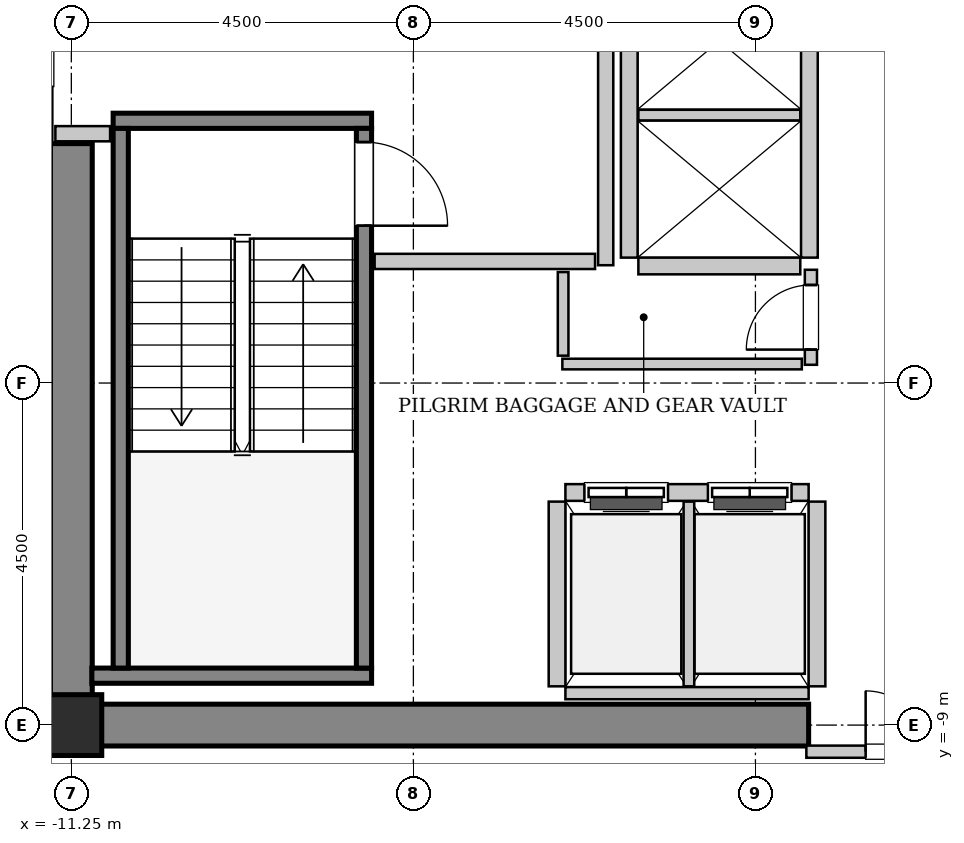
"""IFC4 building model, lengths in metres.
Left out: names, types, materials, properties, quantities, classifications, styles, units other than length and angle.
Written with IfcOpenShell. Run it as: python <this file> out.ifc"""

import sys

from ifc_helpers import new_model, si_unit, direction, frame, frame_2d, origin, origin_2d, place, context, subcontext, project, spatial, rectangle, hollow_rectangle, extrude, source, transform, mapped, element, fill, save


model = new_model("IFC4")
c1 = context("Model", 3, precision=1e-05, world=origin(), true_north=direction((0.0, 1.0)))
c2 = subcontext(c1, "Body", "Model", "MODEL_VIEW")
j1 = project(units=[si_unit("LENGTHUNIT", "METRE"), si_unit("PLANEANGLEUNIT", "RADIAN")], contexts=[c1])
p1 = place(None, origin())
s1 = spatial("IfcSite", under=j1, at=p1, CompositionType="ELEMENT")
p2 = place(p1, origin())
s2 = spatial("IfcBuilding", under=s1, at=p2, CompositionType="ELEMENT")
p3 = place(p2, frame((0.0, 0.0, 194.4)))
s3 = spatial("IfcBuildingStorey", under=s2, at=p3, CompositionType="ELEMENT", Elevation=194.4)
m1 = source(origin(), c2, "Body", "SweptSolid", [
    extrude(rectangle(XDim=9.975, YDim=0.55, at=frame_2d((4.987, 0.0))), origin(), (0.0, 0.0, 1.0), 3.8),
])
p4 = place(p3, frame((-11.525, -9.0, 0.0), z_axis=(0.0, 0.0, 1.0), x_axis=(1.0, 0.0, 0.0)))
e1 = element("IfcWall", 1, at=p4, inside=s3, PredefinedType="SHEAR", context=c2, shape_type="MappedRepresentation", body=[
    mapped(m1, transform((0.0, 0.0, 0.0), x_axis=(1.0, 0.0, 0.0), y_axis=(0.0, 1.0, 0.0), z_axis=(0.0, 0.0, 1.0), scale=1.0)),
])
m2 = source(origin(), c2, "Body", "SweptSolid", [
    extrude(rectangle(XDim=7.375, YDim=0.55, at=frame_2d((3.688, 0.0))), origin(), (0.0, 0.0, 1.0), 3.8),
])
p5 = place(p3, frame((-11.25, -8.725, 0.0), z_axis=(0.0, 0.0, 1.0), x_axis=(0.0, 1.0, 0.0)))
e2 = element("IfcWall", 2, at=p5, inside=s3, PredefinedType="SHEAR", context=c2, shape_type="MappedRepresentation", body=[
    mapped(m2, transform((0.0, 0.0, 0.0), x_axis=(1.0, 0.0, 0.0), y_axis=(0.0, 1.0, 0.0), z_axis=(0.0, 0.0, 1.0), scale=1.0)),
])
m3 = source(origin(), c2, "Body", "SweptSolid", [
    extrude(hollow_rectangle(XDim=0.8, YDim=0.8, WallThickness=0.04, InnerFilletRadius=0.04, OuterFilletRadius=0.08, at=origin_2d()), origin(), (0.0, 0.0, 1.0), 3.8),
])
p6 = place(p3, frame((-11.25, -9.0, 0.0), z_axis=(0.0, 0.0, 1.0), x_axis=(1.0, 0.0, 0.0)))
e3 = element("IfcColumn", 3, at=p6, inside=s3, PredefinedType="COLUMN", context=c2, shape_type="MappedRepresentation", body=[
    mapped(m3, transform((0.0, 0.0, 0.0), x_axis=(1.0, 0.0, 0.0), y_axis=(0.0, 1.0, 0.0), z_axis=(0.0, 0.0, 1.0), scale=1.0)),
])
m4 = source(origin(), c2, "Body", "SweptSolid", [
    extrude(rectangle(XDim=3.4, YDim=0.2, at=frame_2d((1.7, 0.0))), origin(), (0.0, 0.0, 1.0), 3.8),
])
p7 = place(p3, frame((-10.7, -1.05, 0.0), z_axis=(0.0, 0.0, 1.0), x_axis=(1.0, 0.0, 0.0)))
e4 = element("IfcWall", 4, at=p7, inside=s3, PredefinedType="SOLIDWALL", context=c2, shape_type="MappedRepresentation", body=[
    mapped(m4, transform((0.0, 0.0, 0.0), x_axis=(1.0, 0.0, 0.0), y_axis=(0.0, 1.0, 0.0), z_axis=(0.0, 0.0, 1.0), scale=1.0)),
])
m5 = source(origin(), c2, "Body", "SweptSolid", [
    extrude(rectangle(XDim=3.68, YDim=0.2, at=frame_2d((1.84, 0.0))), origin(), (0.0, 0.0, 1.0), 3.8),
])
p8 = place(p3, frame((-10.98, -8.35, 0.0), z_axis=(0.0, 0.0, 1.0), x_axis=(1.0, 0.0, 0.0)))
e5 = element("IfcWall", 5, at=p8, inside=s3, PredefinedType="SOLIDWALL", context=c2, shape_type="MappedRepresentation", body=[
    mapped(m5, transform((0.0, 0.0, 0.0), x_axis=(1.0, 0.0, 0.0), y_axis=(0.0, 1.0, 0.0), z_axis=(0.0, 0.0, 1.0), scale=1.0)),
])
m6 = source(origin(), c2, "Body", "SweptSolid", [
    extrude(rectangle(XDim=7.1, YDim=0.2, at=frame_2d((3.55, 0.0))), origin(), (0.0, 0.0, 1.0), 3.8),
])
p9 = place(p3, frame((-10.6, -1.15, 0.0), z_axis=(0.0, 0.0, 1.0), x_axis=(0.0, -1.0, 0.0)))
e6 = element("IfcWall", 6, at=p9, inside=s3, PredefinedType="SOLIDWALL", context=c2, shape_type="MappedRepresentation", body=[
    mapped(m6, transform((0.0, 0.0, 0.0), x_axis=(1.0, 0.0, 0.0), y_axis=(0.0, 1.0, 0.0), z_axis=(0.0, 0.0, 1.0), scale=1.0)),
])
p10 = place(p3, frame((-7.4, -1.15, 0.0), z_axis=(0.0, 0.0, 1.0), x_axis=(0.0, -1.0, 0.0)))
e7 = element("IfcWall", 7, at=p10, inside=s3, PredefinedType="SOLIDWALL", context=c2, shape_type="MappedRepresentation", body=[
    mapped(m6, transform((0.0, 0.0, 0.0), x_axis=(1.0, 0.0, 0.0), y_axis=(0.0, 1.0, 0.0), z_axis=(0.0, 0.0, 1.0), scale=1.0)),
])
p11 = place(p10, frame((0.18, 0.0, 0.0)))
e8 = element("IfcOpeningElement", 8, at=p11, cuts=e7, PredefinedType="OPENING", context=c2, shape_type="SweptSolid", body=[
    extrude(rectangle(XDim=1.1, YDim=2.15, at=frame_2d((0.55, 1.075))), frame((0.0, 0.11, 0.0), z_axis=(0.0, -1.0, 0.0), x_axis=(1.0, 0.0, 0.0)), (0.0, 0.0, 1.0), 0.22),
])
m7 = source(origin(), c2, "Body", "SweptSolid", [
    extrude(rectangle(XDim=3.2, YDim=0.22, at=frame_2d((1.6, 0.0))), origin(), (0.0, 0.0, 1.0), 3.535),
])
p12 = place(p3, frame((-1.55, -5.94, 0.0), z_axis=(0.0, 0.0, 1.0), x_axis=(-1.0, 0.0, 0.0)))
e9 = element("IfcWall", 9, at=p12, inside=s3, PredefinedType="SOLIDWALL", context=c2, shape_type="MappedRepresentation", body=[
    mapped(m7, transform((0.0, 0.0, 0.0), x_axis=(1.0, 0.0, 0.0), y_axis=(0.0, 1.0, 0.0), z_axis=(0.0, 0.0, 1.0), scale=1.0)),
])
p13 = place(p12, frame((1.85, 0.0, 0.0)))
e10 = element("IfcOpeningElement", 10, at=p13, cuts=e9, PredefinedType="OPENING", context=c2, shape_type="SweptSolid", body=[
    extrude(rectangle(XDim=1.1, YDim=2.2, at=frame_2d((0.55, 1.1))), frame((0.0, 0.12, 0.0), z_axis=(0.0, -1.0, 0.0), x_axis=(1.0, 0.0, 0.0)), (0.0, 0.0, 1.0), 0.24),
])
p14 = place(p12, frame((0.225, 0.0, 0.0)))
e11 = element("IfcOpeningElement", 11, at=p14, cuts=e9, PredefinedType="OPENING", context=c2, shape_type="SweptSolid", body=[
    extrude(rectangle(XDim=1.1, YDim=2.2, at=frame_2d((0.55, 1.1))), frame((0.0, 0.12, 0.0), z_axis=(0.0, -1.0, 0.0), x_axis=(1.0, 0.0, 0.0)), (0.0, 0.0, 1.0), 0.24),
])
m8 = source(origin(), c2, "Body", "SweptSolid", [
    extrude(rectangle(XDim=3.2, YDim=0.16, at=frame_2d((1.6, 0.0))), origin(), (0.0, 0.0, 1.0), 2.425),
])
p15 = place(p3, frame((-4.75, -8.58, 0.0), z_axis=(0.0, 0.0, 1.0), x_axis=(1.0, 0.0, 0.0)))
e12 = element("IfcWall", 12, at=p15, inside=s3, PredefinedType="PARTITIONING", context=c2, shape_type="MappedRepresentation", body=[
    mapped(m8, transform((0.0, 0.0, 0.0), x_axis=(1.0, 0.0, 0.0), y_axis=(0.0, 1.0, 0.0), z_axis=(0.0, 0.0, 1.0), scale=1.0)),
])
m9 = source(origin(), c2, "Body", "SweptSolid", [
    extrude(rectangle(XDim=2.43, YDim=0.22, at=frame_2d((1.215, 0.0))), origin(), (0.0, 0.0, 1.0), 3.535),
])
p16 = place(p3, frame((-4.86, -6.06, 0.0), z_axis=(0.0, 0.0, 1.0), x_axis=(0.0, -1.0, 0.0)))
e13 = element("IfcWall", 13, at=p16, inside=s3, PredefinedType="SOLIDWALL", context=c2, shape_type="MappedRepresentation", body=[
    mapped(m9, transform((0.0, 0.0, 0.0), x_axis=(1.0, 0.0, 0.0), y_axis=(0.0, 1.0, 0.0), z_axis=(0.0, 0.0, 1.0), scale=1.0)),
])
m10 = source(origin(), c2, "Body", "SweptSolid", [
    extrude(rectangle(XDim=2.43, YDim=0.14, at=frame_2d((1.215, 0.0))), origin(), (0.0, 0.0, 1.0), 3.535),
])
p17 = place(p3, frame((-3.125, -8.49, 0.0), z_axis=(0.0, 0.0, 1.0), x_axis=(0.0, 1.0, 0.0)))
e14 = element("IfcWall", 14, at=p17, inside=s3, PredefinedType="PARTITIONING", context=c2, shape_type="MappedRepresentation", body=[
    mapped(m10, transform((0.0, 0.0, 0.0), x_axis=(1.0, 0.0, 0.0), y_axis=(0.0, 1.0, 0.0), z_axis=(0.0, 0.0, 1.0), scale=1.0)),
])
p18 = place(p3, frame((-1.44, -8.49, 0.0), z_axis=(0.0, 0.0, 1.0), x_axis=(0.0, 1.0, 0.0)))
e15 = element("IfcWall", 15, at=p18, inside=s3, PredefinedType="SOLIDWALL", context=c2, shape_type="MappedRepresentation", body=[
    mapped(m9, transform((0.0, 0.0, 0.0), x_axis=(1.0, 0.0, 0.0), y_axis=(0.0, 1.0, 0.0), z_axis=(0.0, 0.0, 1.0), scale=1.0)),
])
m11 = source(origin(), c2, "Body", "SweptSolid", [
    extrude(rectangle(XDim=5.7, YDim=0.22, at=frame_2d((2.85, 0.0))), origin(), (0.0, 0.0, 1.0), 3.535),
])
for number, where, z_axis, x_axis in (
    (16, (-1.54, -2.85, 0.0), (0.0, 0.0, 1.0), (0.0, 1.0, 0.0)),
    (17, (-3.91, 2.85, 0.0), (0.0, 0.0, 1.0), (0.0, -1.0, 0.0)),
):
    element("IfcWall", number, at=place(p3, frame(where, z_axis=z_axis, x_axis=x_axis)), inside=s3, PredefinedType="SOLIDWALL", context=c2, shape_type="MappedRepresentation", body=[
        mapped(m11, transform((0.0, 0.0, 0.0), x_axis=(1.0, 0.0, 0.0), y_axis=(0.0, 1.0, 0.0), z_axis=(0.0, 0.0, 1.0), scale=1.0)),
    ])
m12 = source(origin(), c2, "Body", "SweptSolid", [
    extrude(rectangle(XDim=2.13, YDim=0.22, at=frame_2d((1.065, 0.0))), origin(), (0.0, 0.0, 1.0), 3.535),
])
p19 = place(p3, frame((-3.79, -2.96, 0.0), z_axis=(0.0, 0.0, 1.0), x_axis=(1.0, 0.0, 0.0)))
e18 = element("IfcWall", 18, at=p19, inside=s3, PredefinedType="SOLIDWALL", context=c2, shape_type="MappedRepresentation", body=[
    mapped(m12, transform((0.0, 0.0, 0.0), x_axis=(1.0, 0.0, 0.0), y_axis=(0.0, 1.0, 0.0), z_axis=(0.0, 0.0, 1.0), scale=1.0)),
])
m13 = source(origin(), c2, "Body", "SweptSolid", [
    extrude(rectangle(XDim=2.13, YDim=0.14, at=frame_2d((1.065, 0.0))), origin(), (0.0, 0.0, 1.0), 3.535),
])
p20 = place(p3, frame((-3.79, -0.975, 0.0), z_axis=(0.0, 0.0, 1.0), x_axis=(1.0, 0.0, 0.0)))
e19 = element("IfcWall", 19, at=p20, inside=s3, PredefinedType="PARTITIONING", context=c2, shape_type="MappedRepresentation", body=[
    mapped(m13, transform((0.0, 0.0, 0.0), x_axis=(1.0, 0.0, 0.0), y_axis=(0.0, 1.0, 0.0), z_axis=(0.0, 0.0, 1.0), scale=1.0)),
])
m14 = source(origin(), c2, "Body", "SweptSolid", [
    extrude(rectangle(XDim=5.9, YDim=0.2, at=frame_2d((2.95, 0.0))), origin(), (0.0, 0.0, 1.0), 3.535),
])
p21 = place(p3, frame((-4.22, -2.95, 0.0), z_axis=(0.0, 0.0, 1.0), x_axis=(0.0, 1.0, 0.0)))
e20 = element("IfcWall", 20, at=p21, inside=s3, PredefinedType="PARTITIONING", context=c2, shape_type="MappedRepresentation", body=[
    mapped(m14, transform((0.0, 0.0, 0.0), x_axis=(1.0, 0.0, 0.0), y_axis=(0.0, 1.0, 0.0), z_axis=(0.0, 0.0, 1.0), scale=1.0)),
])
m15 = source(origin(), c2, "Body", "SweptSolid", [
    extrude(rectangle(XDim=2.9, YDim=0.2, at=frame_2d((1.45, 0.0))), origin(), (0.0, 0.0, 1.0), 3.535),
])
p22 = place(p3, frame((-7.26, -2.9, 0.0), z_axis=(0.0, 0.0, 1.0), x_axis=(1.0, 0.0, 0.0)))
e21 = element("IfcWall", 21, at=p22, inside=s3, PredefinedType="PARTITIONING", context=c2, shape_type="MappedRepresentation", body=[
    mapped(m15, transform((0.0, 0.0, 0.0), x_axis=(1.0, 0.0, 0.0), y_axis=(0.0, 1.0, 0.0), z_axis=(0.0, 0.0, 1.0), scale=1.0)),
])
m16 = source(origin(), c2, "Body", "SweptSolid", [
    extrude(rectangle(XDim=0.72, YDim=0.2, at=frame_2d((0.36, 0.0))), origin(), (0.0, 0.0, 1.0), 3.535),
])
p23 = place(p3, frame((-11.46, -1.22, 0.0), z_axis=(0.0, 0.0, 1.0), x_axis=(1.0, 0.0, 0.0)))
e22 = element("IfcWall", 22, at=p23, inside=s3, PredefinedType="PARTITIONING", context=c2, shape_type="MappedRepresentation", body=[
    mapped(m16, transform((0.0, 0.0, 0.0), x_axis=(1.0, 0.0, 0.0), y_axis=(0.0, 1.0, 0.0), z_axis=(0.0, 0.0, 1.0), scale=1.0)),
])
m17 = source(origin(), c2, "Body", "SweptSolid", [
    extrude(rectangle(XDim=3.16, YDim=0.16, at=frame_2d((1.58, 0.0))), origin(), (0.0, 0.0, 1.0), 2.425),
])
p24 = place(p3, frame((-1.58, -9.35, 0.0), z_axis=(0.0, 0.0, 1.0), x_axis=(1.0, 0.0, 0.0)))
e23 = element("IfcWall", 23, at=p24, inside=s3, PredefinedType="PARTITIONING", context=c2, shape_type="MappedRepresentation", body=[
    mapped(m17, transform((0.0, 0.0, 0.0), x_axis=(1.0, 0.0, 0.0), y_axis=(0.0, 1.0, 0.0), z_axis=(0.0, 0.0, 1.0), scale=1.0)),
])
p25 = place(p24, frame((0.78, 0.0, 0.0)))
e24 = element("IfcOpeningElement", 24, at=p25, cuts=e23, PredefinedType="OPENING", context=c2, shape_type="SweptSolid", body=[
    extrude(rectangle(XDim=1.6, YDim=2.3, at=frame_2d((0.8, 1.15))), frame((0.0, 0.09, 0.0), z_axis=(0.0, -1.0, 0.0), x_axis=(1.0, 0.0, 0.0)), (0.0, 0.0, 1.0), 0.18),
])
m18 = source(origin(), c2, "Body", "SweptSolid", [
    extrude(rectangle(XDim=1.25, YDim=0.16, at=frame_2d((0.625, 0.0))), origin(), (0.0, 0.0, 1.0), 3.535),
])
p26 = place(p3, frame((-1.52, -4.26, 0.0), z_axis=(0.0, 0.0, 1.0), x_axis=(0.0, 1.0, 0.0)))
e25 = element("IfcWall", 25, at=p26, inside=s3, PredefinedType="PARTITIONING", context=c2, shape_type="MappedRepresentation", body=[
    mapped(m18, transform((0.0, 0.0, 0.0), x_axis=(1.0, 0.0, 0.0), y_axis=(0.0, 1.0, 0.0), z_axis=(0.0, 0.0, 1.0), scale=1.0)),
])
p27 = place(p26, frame((0.2, 0.0, 0.0)))
e26 = element("IfcOpeningElement", 26, at=p27, cuts=e25, PredefinedType="OPENING", context=c2, shape_type="SweptSolid", body=[
    extrude(rectangle(XDim=0.85, YDim=2.1, at=frame_2d((0.425, 1.05))), frame((0.0, 0.09, 0.0), z_axis=(0.0, -1.0, 0.0), x_axis=(1.0, 0.0, 0.0)), (0.0, 0.0, 1.0), 0.18),
])
m19 = source(origin(), c2, "Body", "SweptSolid", [
    extrude(rectangle(XDim=3.15, YDim=0.14, at=frame_2d((1.575, 0.0))), origin(), (0.0, 0.0, 1.0), 3.535),
])
p28 = place(p3, frame((-4.79, -4.25, 0.0), z_axis=(0.0, 0.0, 1.0), x_axis=(1.0, 0.0, 0.0)))
e27 = element("IfcWall", 27, at=p28, inside=s3, PredefinedType="PARTITIONING", context=c2, shape_type="MappedRepresentation", body=[
    mapped(m19, transform((0.0, 0.0, 0.0), x_axis=(1.0, 0.0, 0.0), y_axis=(0.0, 1.0, 0.0), z_axis=(0.0, 0.0, 1.0), scale=1.0)),
])
m20 = source(origin(), c2, "Body", "SweptSolid", [
    extrude(rectangle(XDim=1.1, YDim=0.14, at=frame_2d((0.55, 0.0))), origin(), (0.0, 0.0, 1.0), 3.535),
])
p29 = place(p3, frame((-4.78, -4.14, 0.0), z_axis=(0.0, 0.0, 1.0), x_axis=(0.0, 1.0, 0.0)))
e28 = element("IfcWall", 28, at=p29, inside=s3, PredefinedType="PARTITIONING", context=c2, shape_type="MappedRepresentation", body=[
    mapped(m20, transform((0.0, 0.0, 0.0), x_axis=(1.0, 0.0, 0.0), y_axis=(0.0, 1.0, 0.0), z_axis=(0.0, 0.0, 1.0), scale=1.0)),
])
m21 = source(origin(), c2, "Body", "SweptSolid", [
    extrude(rectangle(XDim=1.1, YDim=2.15, at=frame_2d((0.55, 1.075))), frame((0.0, 0.025, 0.0), z_axis=(0.0, -1.0, 0.0), x_axis=(1.0, 0.0, 0.0)), (0.0, 0.0, 1.0), 0.05),
])
p30 = place(p11, origin())
e29 = element("IfcDoor", 29, at=p30, inside=s3, OperationType="SINGLE_SWING_RIGHT", PredefinedType="DOOR", context=c2, shape_type="MappedRepresentation", body=[
    mapped(m21, transform((0.0, 0.0, 0.0), x_axis=(1.0, 0.0, 0.0), y_axis=(0.0, 1.0, 0.0), z_axis=(0.0, 0.0, 1.0), scale=1.0)),
])
fill(e8, e29)
m22 = source(origin(), c2, "Body", "SweptSolid", [
    extrude(rectangle(XDim=1.1, YDim=2.2, at=frame_2d((0.55, 1.1))), frame((0.0, 0.025, 0.0), z_axis=(0.0, -1.0, 0.0), x_axis=(1.0, 0.0, 0.0)), (0.0, 0.0, 1.0), 0.05),
])
p31 = place(p13, origin())
e30 = element("IfcDoor", 30, at=p31, inside=s3, OperationType="DOUBLE_DOOR_SLIDING", PredefinedType="DOOR", context=c2, shape_type="MappedRepresentation", body=[
    mapped(m22, transform((0.0, 0.0, 0.0), x_axis=(1.0, 0.0, 0.0), y_axis=(0.0, 1.0, 0.0), z_axis=(0.0, 0.0, 1.0), scale=1.0)),
])
fill(e10, e30)
p32 = place(p14, origin())
e31 = element("IfcDoor", 31, at=p32, inside=s3, OperationType="DOUBLE_DOOR_SLIDING", PredefinedType="DOOR", context=c2, shape_type="MappedRepresentation", body=[
    mapped(m22, transform((0.0, 0.0, 0.0), x_axis=(1.0, 0.0, 0.0), y_axis=(0.0, 1.0, 0.0), z_axis=(0.0, 0.0, 1.0), scale=1.0)),
])
fill(e11, e31)
m23 = source(origin(), c2, "Body", "SweptSolid", [
    extrude(rectangle(XDim=1.6, YDim=2.3, at=frame_2d((0.8, 1.15))), frame((0.0, 0.025, 0.0), z_axis=(0.0, -1.0, 0.0), x_axis=(1.0, 0.0, 0.0)), (0.0, 0.0, 1.0), 0.05),
])
p33 = place(p25, origin())
e32 = element("IfcDoor", 32, at=p33, inside=s3, OperationType="DOUBLE_DOOR_SINGLE_SWING", PredefinedType="DOOR", context=c2, shape_type="MappedRepresentation", body=[
    mapped(m23, transform((0.0, 0.0, 0.0), x_axis=(1.0, 0.0, 0.0), y_axis=(0.0, 1.0, 0.0), z_axis=(0.0, 0.0, 1.0), scale=1.0)),
])
fill(e24, e32)
m24 = source(origin(), c2, "Body", "SweptSolid", [
    extrude(rectangle(XDim=0.85, YDim=2.1, at=frame_2d((0.425, 1.05))), frame((0.0, 0.025, 0.0), z_axis=(0.0, -1.0, 0.0), x_axis=(1.0, 0.0, 0.0)), (0.0, 0.0, 1.0), 0.05),
])
p34 = place(p27, origin())
e33 = element("IfcDoor", 33, at=p34, inside=s3, OperationType="SINGLE_SWING_LEFT", PredefinedType="DOOR", context=c2, shape_type="MappedRepresentation", body=[
    mapped(m24, transform((0.0, 0.0, 0.0), x_axis=(1.0, 0.0, 0.0), y_axis=(0.0, 1.0, 0.0), z_axis=(0.0, 0.0, 1.0), scale=1.0)),
])
fill(e26, e33)
save(model, sys.argv[1])
